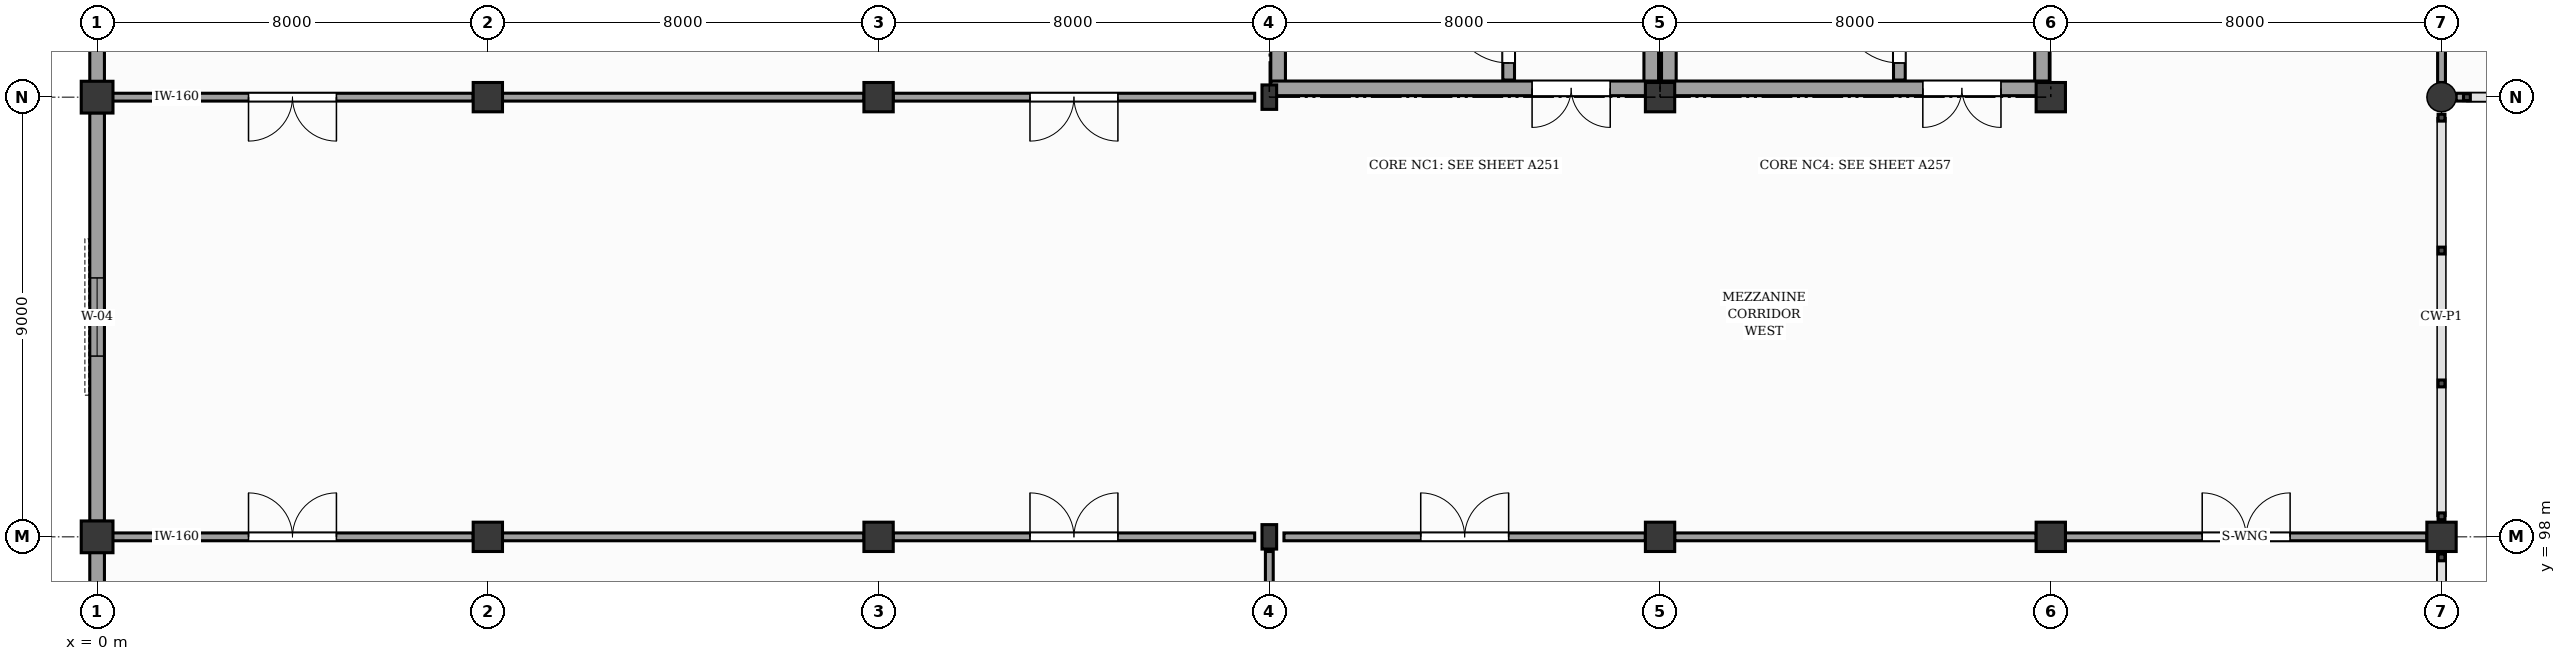
"""IFC4 building model, lengths in metres.
Left out: names, types, materials, properties, quantities, classifications, styles, units other than length and angle.
Written with IfcOpenShell. Run it as: python <this file> out.ifc"""

import sys

from ifc_helpers import new_model, si_unit, direction, frame, frame_2d, origin, origin_2d, place, context, subcontext, project, spatial, rectangle, circle, i_section, extrude, element, fill, save


model = new_model("IFC4")
c1 = context("Model", 3, precision=1e-05, world=origin(), true_north=direction((0.0, 1.0)))
c2 = subcontext(c1, "Body", "Model", "MODEL_VIEW")
j1 = project(units=[si_unit("LENGTHUNIT", "METRE"), si_unit("PLANEANGLEUNIT", "RADIAN")], contexts=[c1])
p1 = place(None, origin())
s1 = spatial("IfcSite", under=j1, at=p1, CompositionType="ELEMENT")
p2 = place(p1, origin())
s2 = spatial("IfcBuilding", under=s1, at=p2, CompositionType="ELEMENT")
p3 = place(p2, frame((0.0, 0.0, 4.8)))
s3 = spatial("IfcBuildingStorey", under=s2, at=p3, CompositionType="ELEMENT", Elevation=4.8)
for number, where, z_axis, x_axis in (
    (1, (0.0, 98.0, 0.0), (0.0, 0.0, 1.0), (1.0, 0.0, 0.0)),
    (2, (0.0, 107.0, 0.0), (0.0, 0.0, 1.0), (1.0, 0.0, 0.0)),
):
    element("IfcColumn", number, at=place(p3, frame(where, z_axis=z_axis, x_axis=x_axis)), inside=s3, PredefinedType="COLUMN", context=c2, shape_type="SweptSolid", body=[
        extrude(rectangle(XDim=0.65, YDim=0.65, at=origin_2d()), origin(), (0.0, 0.0, 1.0), 4.8),
    ])
for number, where, z_axis, x_axis in (
    (3, (8.0, 98.0, 0.0), (0.0, 0.0, 1.0), (1.0, 0.0, 0.0)),
    (4, (8.0, 107.0, 0.0), (0.0, 0.0, 1.0), (1.0, 0.0, 0.0)),
    (5, (16.0, 98.0, 0.0), (0.0, 0.0, 1.0), (1.0, 0.0, 0.0)),
    (6, (16.0, 107.0, 0.0), (0.0, 0.0, 1.0), (1.0, 0.0, 0.0)),
):
    element("IfcColumn", number, at=place(p3, frame(where, z_axis=z_axis, x_axis=x_axis)), inside=s3, PredefinedType="COLUMN", context=c2, shape_type="SweptSolid", body=[
        extrude(rectangle(XDim=0.6, YDim=0.6, at=origin_2d()), origin(), (0.0, 0.0, 1.0), 4.8),
    ])
for number, where, z_axis, x_axis in (
    (7, (24.0, 98.0, 0.0), (0.0, 0.0, 1.0), (1.0, 0.0, 0.0)),
    (8, (24.0, 107.0, 0.0), (0.0, 0.0, 1.0), (1.0, 0.0, 0.0)),
):
    element("IfcColumn", number, at=place(p3, frame(where, z_axis=z_axis, x_axis=x_axis)), inside=s3, PredefinedType="COLUMN", context=c2, shape_type="SweptSolid", body=[
        extrude(i_section(OverallWidth=0.3, OverallDepth=0.5, WebThickness=0.014, FlangeThickness=0.028, FilletRadius=0.027, at=origin_2d()), origin(), (0.0, 0.0, 1.0), 4.8),
    ])
for number, where, z_axis, x_axis in (
    (9, (32.0, 98.0, 0.0), (0.0, 0.0, 1.0), (1.0, 0.0, 0.0)),
    (10, (32.0, 107.0, 0.0), (0.0, 0.0, 1.0), (1.0, 0.0, 0.0)),
    (11, (40.0, 98.0, 0.0), (0.0, 0.0, 1.0), (1.0, 0.0, 0.0)),
    (12, (40.0, 107.0, 0.0), (0.0, 0.0, 1.0), (1.0, 0.0, 0.0)),
    (13, (48.0, 98.0, 0.0), (0.0, 0.0, 1.0), (1.0, 0.0, 0.0)),
):
    element("IfcColumn", number, at=place(p3, frame(where, z_axis=z_axis, x_axis=x_axis)), inside=s3, PredefinedType="COLUMN", context=c2, shape_type="SweptSolid", body=[
        extrude(rectangle(XDim=0.6, YDim=0.6, at=origin_2d()), origin(), (0.0, 0.0, 1.0), 4.8),
    ])
p4 = place(p3, frame((48.0, 107.0, 0.0), z_axis=(0.0, 0.0, 1.0), x_axis=(1.0, 0.0, 0.0)))
e14 = element("IfcColumn", 14, at=p4, inside=s3, PredefinedType="COLUMN", context=c2, shape_type="SweptSolid", body=[
    extrude(circle(Radius=0.3, at=origin_2d()), origin(), (0.0, 0.0, 1.0), 4.8),
])
p5 = place(p3, frame((0.0, 89.32, 0.0), z_axis=(0.0, 0.0, 1.0), x_axis=(0.0, 1.0, 0.0)))
e15 = element("IfcWall", 15, at=p5, inside=s3, PredefinedType="SOLIDWALL", context=c2, shape_type="SweptSolid", body=[
    extrude(rectangle(XDim=8.36, YDim=0.3, at=frame_2d((4.18, 0.0))), origin(), (0.0, 0.0, 1.0), 3.71),
])
p6 = place(p5, frame((3.38, 0.0, 0.95)))
e16 = element("IfcOpeningElement", 16, at=p6, cuts=e15, PredefinedType="OPENING", context=c2, shape_type="SweptSolid", body=[
    extrude(rectangle(XDim=1.6, YDim=2.1, at=frame_2d((0.8, 1.05))), frame((0.0, 0.16, 0.0), z_axis=(0.0, -1.0, 0.0), x_axis=(1.0, 0.0, 0.0)), (0.0, 0.0, 1.0), 0.32),
])
p7 = place(p3, frame((0.0, 98.32, 0.0), z_axis=(0.0, 0.0, 1.0), x_axis=(0.0, 1.0, 0.0)))
e17 = element("IfcWall", 17, at=p7, inside=s3, PredefinedType="SOLIDWALL", context=c2, shape_type="SweptSolid", body=[
    extrude(rectangle(XDim=8.36, YDim=0.3, at=frame_2d((4.18, 0.0))), origin(), (0.0, 0.0, 1.0), 3.71),
])
p8 = place(p7, frame((3.38, 0.0, 0.95)))
e18 = element("IfcOpeningElement", 18, at=p8, cuts=e17, PredefinedType="OPENING", context=c2, shape_type="SweptSolid", body=[
    extrude(rectangle(XDim=1.6, YDim=2.1, at=frame_2d((0.8, 1.05))), frame((0.0, 0.16, 0.0), z_axis=(0.0, -1.0, 0.0), x_axis=(1.0, 0.0, 0.0)), (0.0, 0.0, 1.0), 0.32),
])
p9 = place(p3, frame((0.0, 107.32, 0.0), z_axis=(0.0, 0.0, 1.0), x_axis=(0.0, 1.0, 0.0)))
e19 = element("IfcWall", 19, at=p9, inside=s3, PredefinedType="SOLIDWALL", context=c2, shape_type="SweptSolid", body=[
    extrude(rectangle(XDim=8.36, YDim=0.3, at=frame_2d((4.18, 0.0))), origin(), (0.0, 0.0, 1.0), 3.81),
])
p10 = place(p9, frame((3.38, 0.0, 0.95)))
e20 = element("IfcOpeningElement", 20, at=p10, cuts=e19, PredefinedType="OPENING", context=c2, shape_type="SweptSolid", body=[
    extrude(rectangle(XDim=1.6, YDim=2.1, at=frame_2d((0.8, 1.05))), frame((0.0, 0.16, 0.0), z_axis=(0.0, -1.0, 0.0), x_axis=(1.0, 0.0, 0.0)), (0.0, 0.0, 1.0), 0.32),
])
p11 = place(p3, frame((28.9, 107.35, 0.0), z_axis=(0.0, 0.0, 1.0), x_axis=(0.0, 1.0, 0.0)))
e21 = element("IfcWall", 21, at=p11, inside=s3, PredefinedType="SHEAR", context=c2, shape_type="SweptSolid", body=[
    extrude(rectangle(XDim=8.3, YDim=0.24, at=frame_2d((4.15, 0.0))), origin(), (0.0, 0.0, 1.0), 4.52),
])
p12 = place(p11, frame((0.35, 0.0, 0.0)))
e22 = element("IfcOpeningElement", 22, at=p12, cuts=e21, PredefinedType="OPENING", context=c2, shape_type="SweptSolid", body=[
    extrude(rectangle(XDim=1.2, YDim=2.15, at=frame_2d((0.6, 1.075))), frame((0.0, 0.13, 0.0), z_axis=(0.0, -1.0, 0.0), x_axis=(1.0, 0.0, 0.0)), (0.0, 0.0, 1.0), 0.26),
])
for number, where, z_axis, x_axis in (
    (23, (24.18, 107.18, 0.0), (0.0, 0.0, 1.0), (0.0, 1.0, 0.0)),
    (24, (31.82, 107.18, 0.0), (0.0, 0.0, 1.0), (0.0, 1.0, 0.0)),
):
    element("IfcWall", number, at=place(p3, frame(where, z_axis=z_axis, x_axis=x_axis)), inside=s3, PredefinedType="SHEAR", context=c2, shape_type="SweptSolid", body=[
        extrude(rectangle(XDim=8.64, YDim=0.3, at=frame_2d((4.32, 0.0))), origin(), (0.0, 0.0, 1.0), 4.52),
    ])
p13 = place(p3, frame((24.03, 107.18, 0.0), z_axis=(0.0, 0.0, 1.0), x_axis=(1.0, 0.0, 0.0)))
e25 = element("IfcWall", 25, at=p13, inside=s3, PredefinedType="SHEAR", context=c2, shape_type="SweptSolid", body=[
    extrude(rectangle(XDim=7.94, YDim=0.3, at=frame_2d((3.97, 0.0))), origin(), (0.0, 0.0, 1.0), 4.52),
])
p14 = place(p13, frame((5.35, 0.0, 0.0)))
e26 = element("IfcOpeningElement", 26, at=p14, cuts=e25, PredefinedType="OPENING", context=c2, shape_type="SweptSolid", body=[
    extrude(rectangle(XDim=1.6, YDim=2.15, at=frame_2d((0.8, 1.075))), frame((0.0, 0.16, 0.0), z_axis=(0.0, -1.0, 0.0), x_axis=(1.0, 0.0, 0.0)), (0.0, 0.0, 1.0), 0.32),
])
p15 = place(p3, frame((36.9, 107.35, 0.0), z_axis=(0.0, 0.0, 1.0), x_axis=(0.0, 1.0, 0.0)))
e27 = element("IfcWall", 27, at=p15, inside=s3, PredefinedType="SHEAR", context=c2, shape_type="SweptSolid", body=[
    extrude(rectangle(XDim=8.3, YDim=0.24, at=frame_2d((4.15, 0.0))), origin(), (0.0, 0.0, 1.0), 4.52),
])
p16 = place(p15, frame((0.35, 0.0, 0.0)))
e28 = element("IfcOpeningElement", 28, at=p16, cuts=e27, PredefinedType="OPENING", context=c2, shape_type="SweptSolid", body=[
    extrude(rectangle(XDim=1.2, YDim=2.15, at=frame_2d((0.6, 1.075))), frame((0.0, 0.13, 0.0), z_axis=(0.0, -1.0, 0.0), x_axis=(1.0, 0.0, 0.0)), (0.0, 0.0, 1.0), 0.26),
])
for number, where, z_axis, x_axis in (
    (29, (32.18, 107.18, 0.0), (0.0, 0.0, 1.0), (0.0, 1.0, 0.0)),
    (30, (39.82, 107.18, 0.0), (0.0, 0.0, 1.0), (0.0, 1.0, 0.0)),
):
    element("IfcWall", number, at=place(p3, frame(where, z_axis=z_axis, x_axis=x_axis)), inside=s3, PredefinedType="SHEAR", context=c2, shape_type="SweptSolid", body=[
        extrude(rectangle(XDim=8.64, YDim=0.3, at=frame_2d((4.32, 0.0))), origin(), (0.0, 0.0, 1.0), 4.52),
    ])
p17 = place(p3, frame((32.03, 107.18, 0.0), z_axis=(0.0, 0.0, 1.0), x_axis=(1.0, 0.0, 0.0)))
e31 = element("IfcWall", 31, at=p17, inside=s3, PredefinedType="SHEAR", context=c2, shape_type="SweptSolid", body=[
    extrude(rectangle(XDim=7.94, YDim=0.3, at=frame_2d((3.97, 0.0))), origin(), (0.0, 0.0, 1.0), 4.52),
])
p18 = place(p17, frame((5.35, 0.0, 0.0)))
e32 = element("IfcOpeningElement", 32, at=p18, cuts=e31, PredefinedType="OPENING", context=c2, shape_type="SweptSolid", body=[
    extrude(rectangle(XDim=1.6, YDim=2.15, at=frame_2d((0.8, 1.075))), frame((0.0, 0.16, 0.0), z_axis=(0.0, -1.0, 0.0), x_axis=(1.0, 0.0, 0.0)), (0.0, 0.0, 1.0), 0.32),
])
p19 = place(p3, frame((0.3, 98.0, 0.0), z_axis=(0.0, 0.0, 1.0), x_axis=(1.0, 0.0, 0.0)))
e33 = element("IfcWall", 33, at=p19, inside=s3, PredefinedType="PARTITIONING", context=c2, shape_type="SweptSolid", body=[
    extrude(rectangle(XDim=7.4, YDim=0.16, at=frame_2d((3.7, 0.0))), origin(), (0.0, 0.0, 1.0), 3.7),
])
p20 = place(p19, frame((2.8, 0.0, 0.0)))
e34 = element("IfcOpeningElement", 34, at=p20, cuts=e33, PredefinedType="OPENING", context=c2, shape_type="SweptSolid", body=[
    extrude(rectangle(XDim=1.8, YDim=2.25, at=frame_2d((0.9, 1.125))), frame((0.0, 0.09, 0.0), z_axis=(0.0, -1.0, 0.0), x_axis=(1.0, 0.0, 0.0)), (0.0, 0.0, 1.0), 0.18),
])
p21 = place(p3, frame((8.3, 98.0, 0.0), z_axis=(0.0, 0.0, 1.0), x_axis=(1.0, 0.0, 0.0)))
e35 = element("IfcWall", 35, at=p21, inside=s3, PredefinedType="PARTITIONING", context=c2, shape_type="SweptSolid", body=[
    extrude(rectangle(XDim=7.4, YDim=0.16, at=frame_2d((3.7, 0.0))), origin(), (0.0, 0.0, 1.0), 3.7),
])
p22 = place(p3, frame((16.3, 98.0, 0.0), z_axis=(0.0, 0.0, 1.0), x_axis=(1.0, 0.0, 0.0)))
e36 = element("IfcWall", 36, at=p22, inside=s3, PredefinedType="PARTITIONING", context=c2, shape_type="SweptSolid", body=[
    extrude(rectangle(XDim=7.4, YDim=0.16, at=frame_2d((3.7, 0.0))), origin(), (0.0, 0.0, 1.0), 3.7),
])
p23 = place(p22, frame((2.8, 0.0, 0.0)))
e37 = element("IfcOpeningElement", 37, at=p23, cuts=e36, PredefinedType="OPENING", context=c2, shape_type="SweptSolid", body=[
    extrude(rectangle(XDim=1.8, YDim=2.25, at=frame_2d((0.9, 1.125))), frame((0.0, 0.09, 0.0), z_axis=(0.0, -1.0, 0.0), x_axis=(1.0, 0.0, 0.0)), (0.0, 0.0, 1.0), 0.18),
])
p24 = place(p3, frame((24.0, 89.3, 0.0), z_axis=(0.0, 0.0, 1.0), x_axis=(0.0, 1.0, 0.0)))
e38 = element("IfcWall", 38, at=p24, inside=s3, PredefinedType="PARTITIONING", context=c2, shape_type="SweptSolid", body=[
    extrude(rectangle(XDim=8.4, YDim=0.16, at=frame_2d((4.2, 0.0))), origin(), (0.0, 0.0, 1.0), 3.7),
])
p25 = place(p3, frame((0.3, 107.0, 0.0), z_axis=(0.0, 0.0, 1.0), x_axis=(1.0, 0.0, 0.0)))
e39 = element("IfcWall", 39, at=p25, inside=s3, PredefinedType="PARTITIONING", context=c2, shape_type="SweptSolid", body=[
    extrude(rectangle(XDim=7.4, YDim=0.16, at=frame_2d((3.7, 0.0))), origin(), (0.0, 0.0, 1.0), 3.7),
])
p26 = place(p25, frame((2.8, 0.0, 0.0)))
e40 = element("IfcOpeningElement", 40, at=p26, cuts=e39, PredefinedType="OPENING", context=c2, shape_type="SweptSolid", body=[
    extrude(rectangle(XDim=1.8, YDim=2.25, at=frame_2d((0.9, 1.125))), frame((0.0, 0.09, 0.0), z_axis=(0.0, -1.0, 0.0), x_axis=(1.0, 0.0, 0.0)), (0.0, 0.0, 1.0), 0.18),
])
p27 = place(p3, frame((8.3, 107.0, 0.0), z_axis=(0.0, 0.0, 1.0), x_axis=(1.0, 0.0, 0.0)))
e41 = element("IfcWall", 41, at=p27, inside=s3, PredefinedType="PARTITIONING", context=c2, shape_type="SweptSolid", body=[
    extrude(rectangle(XDim=7.4, YDim=0.16, at=frame_2d((3.7, 0.0))), origin(), (0.0, 0.0, 1.0), 3.7),
])
p28 = place(p3, frame((16.3, 107.0, 0.0), z_axis=(0.0, 0.0, 1.0), x_axis=(1.0, 0.0, 0.0)))
e42 = element("IfcWall", 42, at=p28, inside=s3, PredefinedType="PARTITIONING", context=c2, shape_type="SweptSolid", body=[
    extrude(rectangle(XDim=7.4, YDim=0.16, at=frame_2d((3.7, 0.0))), origin(), (0.0, 0.0, 1.0), 3.7),
])
p29 = place(p28, frame((2.8, 0.0, 0.0)))
e43 = element("IfcOpeningElement", 43, at=p29, cuts=e42, PredefinedType="OPENING", context=c2, shape_type="SweptSolid", body=[
    extrude(rectangle(XDim=1.8, YDim=2.25, at=frame_2d((0.9, 1.125))), frame((0.0, 0.09, 0.0), z_axis=(0.0, -1.0, 0.0), x_axis=(1.0, 0.0, 0.0)), (0.0, 0.0, 1.0), 0.18),
])
p30 = place(p3, frame((24.3, 98.0, 0.0), z_axis=(0.0, 0.0, 1.0), x_axis=(1.0, 0.0, 0.0)))
e44 = element("IfcWall", 44, at=p30, inside=s3, PredefinedType="PARTITIONING", context=c2, shape_type="SweptSolid", body=[
    extrude(rectangle(XDim=7.4, YDim=0.16, at=frame_2d((3.7, 0.0))), origin(), (0.0, 0.0, 1.0), 3.7),
])
p31 = place(p30, frame((2.8, 0.0, 0.0)))
e45 = element("IfcOpeningElement", 45, at=p31, cuts=e44, PredefinedType="OPENING", context=c2, shape_type="SweptSolid", body=[
    extrude(rectangle(XDim=1.8, YDim=2.25, at=frame_2d((0.9, 1.125))), frame((0.0, 0.09, 0.0), z_axis=(0.0, -1.0, 0.0), x_axis=(1.0, 0.0, 0.0)), (0.0, 0.0, 1.0), 0.18),
])
p32 = place(p3, frame((32.3, 98.0, 0.0), z_axis=(0.0, 0.0, 1.0), x_axis=(1.0, 0.0, 0.0)))
e46 = element("IfcWall", 46, at=p32, inside=s3, PredefinedType="PARTITIONING", context=c2, shape_type="SweptSolid", body=[
    extrude(rectangle(XDim=7.4, YDim=0.16, at=frame_2d((3.7, 0.0))), origin(), (0.0, 0.0, 1.0), 3.7),
])
p33 = place(p3, frame((40.3, 98.0, 0.0), z_axis=(0.0, 0.0, 1.0), x_axis=(1.0, 0.0, 0.0)))
e47 = element("IfcWall", 47, at=p33, inside=s3, PredefinedType="PARTITIONING", context=c2, shape_type="SweptSolid", body=[
    extrude(rectangle(XDim=7.4, YDim=0.16, at=frame_2d((3.7, 0.0))), origin(), (0.0, 0.0, 1.0), 3.7),
])
p34 = place(p33, frame((2.8, 0.0, 0.0)))
e48 = element("IfcOpeningElement", 48, at=p34, cuts=e47, PredefinedType="OPENING", context=c2, shape_type="SweptSolid", body=[
    extrude(rectangle(XDim=1.8, YDim=2.25, at=frame_2d((0.9, 1.125))), frame((0.0, 0.09, 0.0), z_axis=(0.0, -1.0, 0.0), x_axis=(1.0, 0.0, 0.0)), (0.0, 0.0, 1.0), 0.18),
])
p35 = place(p3, frame((48.0, 89.3, 0.0), z_axis=(0.0, 0.0, 1.0), x_axis=(0.0, 1.0, 0.0)))
e49 = element("IfcWall", 49, at=p35, inside=s3, PredefinedType="PARTITIONING", context=c2, shape_type="SweptSolid", body=[
    extrude(rectangle(XDim=8.4, YDim=0.16, at=frame_2d((4.2, 0.0))), origin(), (0.0, 0.0, 1.0), 3.7),
])
p36 = place(p3, frame((48.3, 107.0, 0.0), z_axis=(0.0, 0.0, 1.0), x_axis=(1.0, 0.0, 0.0)))
e50 = element("IfcWall", 50, at=p36, inside=s3, PredefinedType="PARTITIONING", context=c2, shape_type="SweptSolid", body=[
    extrude(rectangle(XDim=7.4, YDim=0.16, at=frame_2d((3.7, 0.0))), origin(), (0.0, 0.0, 1.0), 3.7),
])
p37 = place(p3, frame((48.0, 107.3, 0.0), z_axis=(0.0, 0.0, 1.0), x_axis=(0.0, 1.0, 0.0)))
e51 = element("IfcWall", 51, at=p37, inside=s3, PredefinedType="PARTITIONING", context=c2, shape_type="SweptSolid", body=[
    extrude(rectangle(XDim=8.4, YDim=0.16, at=frame_2d((4.2, 0.0))), origin(), (0.0, 0.0, 1.0), 3.7),
])
p38 = place(p8, origin())
e52 = element("IfcWindow", 52, at=p38, inside=s3, PartitioningType="SINGLE_PANEL", PredefinedType="WINDOW", context=c2, shape_type="SweptSolid", body=[
    extrude(rectangle(XDim=1.6, YDim=2.1, at=frame_2d((0.8, 1.05))), frame((0.0, 0.03, 0.0), z_axis=(0.0, -1.0, 0.0), x_axis=(1.0, 0.0, 0.0)), (0.0, 0.0, 1.0), 0.06),
])
fill(e18, e52)
p39 = place(p12, origin())
e53 = element("IfcDoor", 53, at=p39, inside=s3, OperationType="SINGLE_SWING_RIGHT", PredefinedType="DOOR", context=c2, shape_type="SweptSolid", body=[
    extrude(rectangle(XDim=1.2, YDim=2.15, at=frame_2d((0.6, 1.075))), frame((0.0, 0.025, 0.0), z_axis=(0.0, -1.0, 0.0), x_axis=(1.0, 0.0, 0.0)), (0.0, 0.0, 1.0), 0.05),
])
fill(e22, e53)
p40 = place(p14, frame((1.6, 0.0, 0.0), z_axis=(0.0, 0.0, 1.0), x_axis=(-1.0, 0.0, 0.0)))
e54 = element("IfcDoor", 54, at=p40, inside=s3, OperationType="DOUBLE_DOOR_SINGLE_SWING", PredefinedType="DOOR", context=c2, shape_type="SweptSolid", body=[
    extrude(rectangle(XDim=1.6, YDim=2.15, at=frame_2d((0.8, 1.075))), frame((0.0, 0.025, 0.0), z_axis=(0.0, -1.0, 0.0), x_axis=(1.0, 0.0, 0.0)), (0.0, 0.0, 1.0), 0.05),
])
fill(e26, e54)
p41 = place(p16, origin())
e55 = element("IfcDoor", 55, at=p41, inside=s3, OperationType="SINGLE_SWING_RIGHT", PredefinedType="DOOR", context=c2, shape_type="SweptSolid", body=[
    extrude(rectangle(XDim=1.2, YDim=2.15, at=frame_2d((0.6, 1.075))), frame((0.0, 0.025, 0.0), z_axis=(0.0, -1.0, 0.0), x_axis=(1.0, 0.0, 0.0)), (0.0, 0.0, 1.0), 0.05),
])
fill(e28, e55)
p42 = place(p18, frame((1.6, 0.0, 0.0), z_axis=(0.0, 0.0, 1.0), x_axis=(-1.0, 0.0, 0.0)))
e56 = element("IfcDoor", 56, at=p42, inside=s3, OperationType="DOUBLE_DOOR_SINGLE_SWING", PredefinedType="DOOR", context=c2, shape_type="SweptSolid", body=[
    extrude(rectangle(XDim=1.6, YDim=2.15, at=frame_2d((0.8, 1.075))), frame((0.0, 0.025, 0.0), z_axis=(0.0, -1.0, 0.0), x_axis=(1.0, 0.0, 0.0)), (0.0, 0.0, 1.0), 0.05),
])
fill(e32, e56)
p43 = place(p20, origin())
e57 = element("IfcDoor", 57, at=p43, inside=s3, OperationType="DOUBLE_DOOR_SINGLE_SWING", PredefinedType="DOOR", context=c2, shape_type="SweptSolid", body=[
    extrude(rectangle(XDim=1.8, YDim=2.25, at=frame_2d((0.9, 1.125))), frame((0.0, 0.025, 0.0), z_axis=(0.0, -1.0, 0.0), x_axis=(1.0, 0.0, 0.0)), (0.0, 0.0, 1.0), 0.05),
])
fill(e34, e57)
p44 = place(p23, origin())
e58 = element("IfcDoor", 58, at=p44, inside=s3, OperationType="DOUBLE_DOOR_SINGLE_SWING", PredefinedType="DOOR", context=c2, shape_type="SweptSolid", body=[
    extrude(rectangle(XDim=1.8, YDim=2.25, at=frame_2d((0.9, 1.125))), frame((0.0, 0.025, 0.0), z_axis=(0.0, -1.0, 0.0), x_axis=(1.0, 0.0, 0.0)), (0.0, 0.0, 1.0), 0.05),
])
fill(e37, e58)
p45 = place(p26, frame((1.8, 0.0, 0.0), z_axis=(0.0, 0.0, 1.0), x_axis=(-1.0, 0.0, 0.0)))
e59 = element("IfcDoor", 59, at=p45, inside=s3, OperationType="DOUBLE_DOOR_SINGLE_SWING", PredefinedType="DOOR", context=c2, shape_type="SweptSolid", body=[
    extrude(rectangle(XDim=1.8, YDim=2.25, at=frame_2d((0.9, 1.125))), frame((0.0, 0.025, 0.0), z_axis=(0.0, -1.0, 0.0), x_axis=(1.0, 0.0, 0.0)), (0.0, 0.0, 1.0), 0.05),
])
fill(e40, e59)
p46 = place(p29, frame((1.8, 0.0, 0.0), z_axis=(0.0, 0.0, 1.0), x_axis=(-1.0, 0.0, 0.0)))
e60 = element("IfcDoor", 60, at=p46, inside=s3, OperationType="DOUBLE_DOOR_SINGLE_SWING", PredefinedType="DOOR", context=c2, shape_type="SweptSolid", body=[
    extrude(rectangle(XDim=1.8, YDim=2.25, at=frame_2d((0.9, 1.125))), frame((0.0, 0.025, 0.0), z_axis=(0.0, -1.0, 0.0), x_axis=(1.0, 0.0, 0.0)), (0.0, 0.0, 1.0), 0.05),
])
fill(e43, e60)
p47 = place(p31, origin())
e61 = element("IfcDoor", 61, at=p47, inside=s3, OperationType="DOUBLE_DOOR_SINGLE_SWING", PredefinedType="DOOR", context=c2, shape_type="SweptSolid", body=[
    extrude(rectangle(XDim=1.8, YDim=2.25, at=frame_2d((0.9, 1.125))), frame((0.0, 0.025, 0.0), z_axis=(0.0, -1.0, 0.0), x_axis=(1.0, 0.0, 0.0)), (0.0, 0.0, 1.0), 0.05),
])
fill(e45, e61)
p48 = place(p34, origin())
e62 = element("IfcDoor", 62, at=p48, inside=s3, OperationType="DOUBLE_DOOR_SINGLE_SWING", PredefinedType="DOOR", context=c2, shape_type="SweptSolid", body=[
    extrude(rectangle(XDim=1.8, YDim=2.25, at=frame_2d((0.9, 1.125))), frame((0.0, 0.025, 0.0), z_axis=(0.0, -1.0, 0.0), x_axis=(1.0, 0.0, 0.0)), (0.0, 0.0, 1.0), 0.05),
])
fill(e48, e62)
save(model, sys.argv[1])
